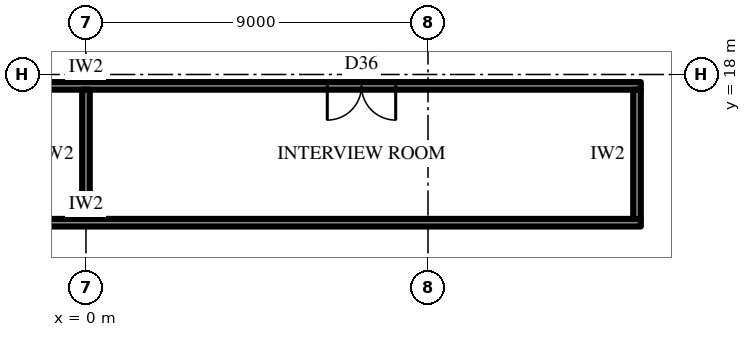
"""IFC4 building model, lengths in metres.
Left out: names, types, materials, properties, quantities, classifications, styles, units other than length and angle.
Written with IfcOpenShell. Run it as: python <this file> out.ifc"""

import sys

from ifc_helpers import new_model, si_unit, direction, frame, frame_2d, origin, place, context, subcontext, project, spatial, rectangle, extrude, element, fill, save


model = new_model("IFC4")
c1 = context("Model", 3, precision=1e-05, world=origin(), true_north=direction((0.0, 1.0)))
c2 = subcontext(c1, "Body", "Model", "MODEL_VIEW")
j1 = project(units=[si_unit("LENGTHUNIT", "METRE"), si_unit("PLANEANGLEUNIT", "RADIAN")], contexts=[c1])
p1 = place(None, origin())
s1 = spatial("IfcSite", under=j1, at=p1, CompositionType="ELEMENT")
p2 = place(p1, origin())
s2 = spatial("IfcBuilding", under=s1, at=p2, CompositionType="ELEMENT")
p3 = place(p2, frame((0.0, 0.0, 232.3)))
s3 = spatial("IfcBuildingStorey", under=s2, at=p3, CompositionType="ELEMENT", Elevation=232.3)
p4 = place(p3, frame((-14.6, 14.1, 0.0), z_axis=(0.0, 0.0, 1.0), x_axis=(1.0, 0.0, 0.0)))
e1 = element("IfcWall", 1, at=p4, inside=s3, PredefinedType="PARTITIONING", context=c2, shape_type="SweptSolid", body=[
    extrude(rectangle(XDim=29.2, YDim=0.2, at=frame_2d((14.6, 0.0))), origin(), (0.0, 0.0, 1.0), 4.0),
])
p5 = place(p3, frame((-14.6, 17.7, 0.0), z_axis=(0.0, 0.0, 1.0), x_axis=(1.0, 0.0, 0.0)))
e2 = element("IfcWall", 2, at=p5, inside=s3, PredefinedType="PARTITIONING", context=c2, shape_type="SweptSolid", body=[
    extrude(rectangle(XDim=29.2, YDim=0.2, at=frame_2d((14.6, 0.0))), origin(), (0.0, 0.0, 1.0), 4.0),
])
p6 = place(p5, frame((6.45, 0.0, 0.0)))
e3 = element("IfcOpeningElement", 3, at=p6, cuts=e2, PredefinedType="OPENING", context=c2, shape_type="SweptSolid", body=[
    extrude(rectangle(XDim=1.8, YDim=2.4, at=frame_2d((0.9, 1.2))), frame((0.0, 0.11, 0.0), z_axis=(0.0, -1.0, 0.0), x_axis=(1.0, 0.0, 0.0)), (0.0, 0.0, 1.0), 0.22),
])
p7 = place(p5, frame((20.95, 0.0, 0.0)))
e4 = element("IfcOpeningElement", 4, at=p7, cuts=e2, PredefinedType="OPENING", context=c2, shape_type="SweptSolid", body=[
    extrude(rectangle(XDim=1.8, YDim=2.4, at=frame_2d((0.9, 1.2))), frame((0.0, 0.11, 0.0), z_axis=(0.0, -1.0, 0.0), x_axis=(1.0, 0.0, 0.0)), (0.0, 0.0, 1.0), 0.22),
])
p8 = place(p3, frame((0.0, 14.2, 0.0), z_axis=(0.0, 0.0, 1.0), x_axis=(0.0, 1.0, 0.0)))
e5 = element("IfcWall", 5, at=p8, inside=s3, PredefinedType="PARTITIONING", context=c2, shape_type="SweptSolid", body=[
    extrude(rectangle(XDim=3.4, YDim=0.2, at=frame_2d((1.7, 0.0))), origin(), (0.0, 0.0, 1.0), 2.992),
])
p9 = place(p3, frame((14.5, 14.2, 0.0), z_axis=(0.0, 0.0, 1.0), x_axis=(0.0, 1.0, 0.0)))
e6 = element("IfcWall", 6, at=p9, inside=s3, PredefinedType="PARTITIONING", context=c2, shape_type="SweptSolid", body=[
    extrude(rectangle(XDim=3.4, YDim=0.2, at=frame_2d((1.7, 0.0))), origin(), (0.0, 0.0, 1.0), 4.0),
])
p10 = place(p7, frame((1.8, 0.0, 0.0), z_axis=(0.0, 0.0, 1.0), x_axis=(-1.0, 0.0, 0.0)))
e7 = element("IfcDoor", 7, at=p10, inside=s3, OperationType="DOUBLE_DOOR_SINGLE_SWING", PredefinedType="DOOR", context=c2, shape_type="SweptSolid", body=[
    extrude(rectangle(XDim=1.8, YDim=2.4, at=frame_2d((0.9, 1.2))), frame((0.0, 0.025, 0.0), z_axis=(0.0, -1.0, 0.0), x_axis=(1.0, 0.0, 0.0)), (0.0, 0.0, 1.0), 0.05),
])
fill(e4, e7)
save(model, sys.argv[1])
